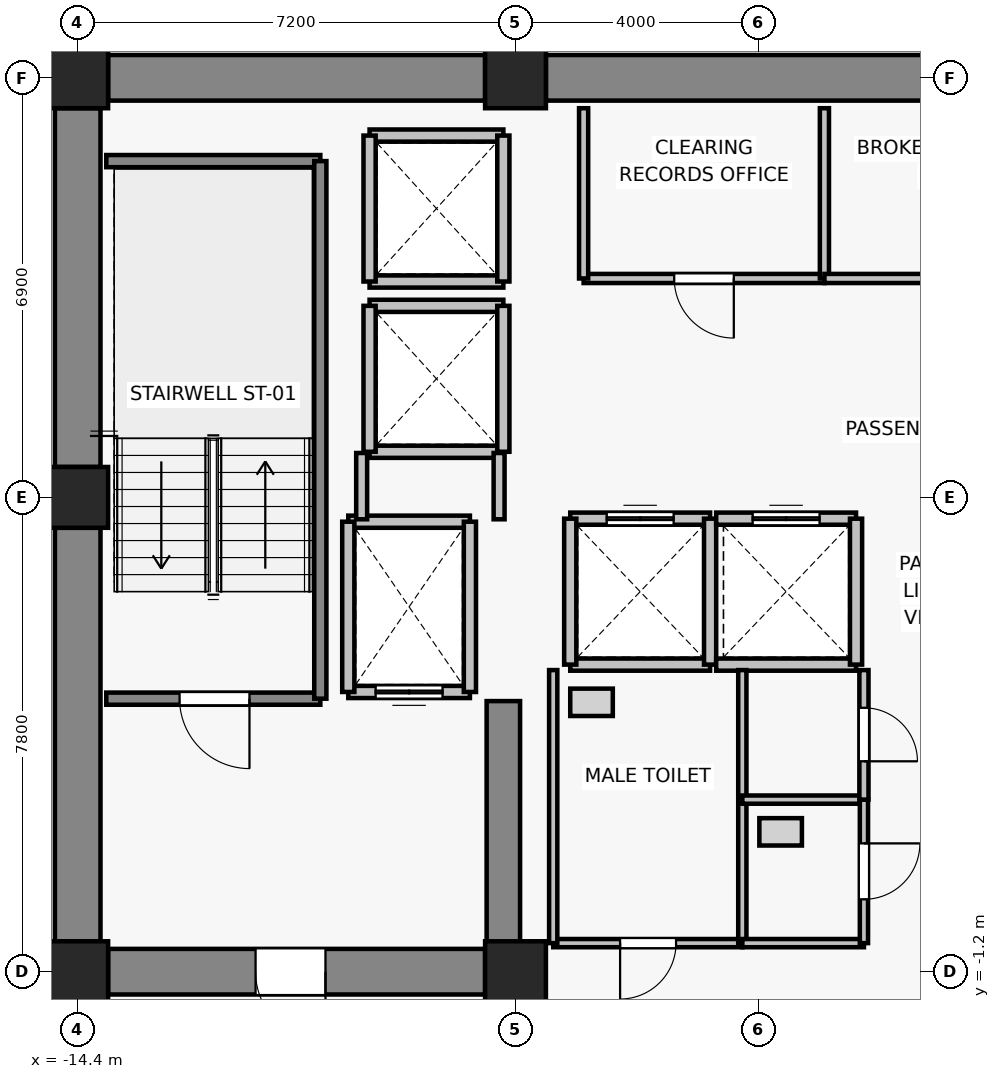
"""IFC4 building model, lengths in metres.
Left out: names, types, materials, properties, quantities, classifications, styles, units other than length and angle.
Written with IfcOpenShell. Run it as: python <this file> out.ifc"""

import sys

from ifc_helpers import new_model, si_unit, direction, frame, frame_2d, origin, origin_2d, place, context, subcontext, project, spatial, rectangle, extrude, source, transform, mapped, element, fill, save


model = new_model("IFC4")
c1 = context("Model", 3, precision=1e-05, world=origin(), true_north=direction((0.0, 1.0)))
c2 = subcontext(c1, "Body", "Model", "MODEL_VIEW")
j1 = project(units=[si_unit("LENGTHUNIT", "METRE"), si_unit("PLANEANGLEUNIT", "RADIAN")], contexts=[c1])
p1 = place(None, origin())
s1 = spatial("IfcSite", under=j1, at=p1, CompositionType="ELEMENT")
p2 = place(p1, origin())
s2 = spatial("IfcBuilding", under=s1, at=p2, CompositionType="ELEMENT")
p3 = place(p2, frame((0.0, 0.0, 175.9)))
s3 = spatial("IfcBuildingStorey", under=s2, at=p3, CompositionType="ELEMENT", Elevation=175.9)
for number, where, z_axis, x_axis in (
    (1, (-14.4, -1.2, 0.0), (0.0, 0.0, 1.0), (1.0, 0.0, 0.0)),
    (2, (-7.2, -1.2, 0.0), (0.0, 0.0, 1.0), (1.0, 0.0, 0.0)),
    (3, (-14.4, 6.6, 0.0), (0.0, 0.0, 1.0), (1.0, 0.0, 0.0)),
    (4, (-14.4, 13.5, 0.0), (0.0, 0.0, 1.0), (1.0, 0.0, 0.0)),
    (5, (-7.2, 13.5, 0.0), (0.0, 0.0, 1.0), (1.0, 0.0, 0.0)),
):
    element("IfcColumn", number, at=place(p3, frame(where, z_axis=z_axis, x_axis=x_axis)), inside=s3, PredefinedType="COLUMN", context=c2, shape_type="SweptSolid", body=[
        extrude(rectangle(XDim=1.0, YDim=1.0, at=origin_2d()), origin(), (0.0, 0.0, 1.0), 3.3),
    ])
p4 = place(p3, frame((-13.9, 13.5, 0.0), z_axis=(0.0, 0.0, 1.0), x_axis=(1.0, 0.0, 0.0)))
e6 = element("IfcWall", 6, at=p4, inside=s3, PredefinedType="SHEAR", context=c2, shape_type="SweptSolid", body=[
    extrude(rectangle(XDim=6.2, YDim=0.75, at=frame_2d((3.1, 0.0))), origin(), (0.0, 0.0, 1.0), 3.075),
])
p5 = place(p3, frame((-6.7, 13.5, 0.0), z_axis=(0.0, 0.0, 1.0), x_axis=(1.0, 0.0, 0.0)))
e7 = element("IfcWall", 7, at=p5, inside=s3, PredefinedType="SHEAR", context=c2, shape_type="SweptSolid", body=[
    extrude(rectangle(XDim=13.4, YDim=0.75, at=frame_2d((6.7, 0.0))), origin(), (0.0, 0.0, 1.0), 3.075),
])
p6 = place(p3, frame((-14.4, -0.7, 0.0), z_axis=(0.0, 0.0, 1.0), x_axis=(0.0, 1.0, 0.0)))
e8 = element("IfcWall", 8, at=p6, inside=s3, PredefinedType="SHEAR", context=c2, shape_type="SweptSolid", body=[
    extrude(rectangle(XDim=6.8, YDim=0.75, at=frame_2d((3.4, 0.0))), origin(), (0.0, 0.0, 1.0), 3.075),
])
p7 = place(p3, frame((-14.4, 7.1, 0.0), z_axis=(0.0, 0.0, 1.0), x_axis=(0.0, 1.0, 0.0)))
e9 = element("IfcWall", 9, at=p7, inside=s3, PredefinedType="SHEAR", context=c2, shape_type="SweptSolid", body=[
    extrude(rectangle(XDim=5.9, YDim=0.75, at=frame_2d((2.95, 0.0))), origin(), (0.0, 0.0, 1.0), 3.075),
])
p8 = place(p3, frame((-7.7, -1.2, 0.0), z_axis=(0.0, 0.0, 1.0), x_axis=(-1.0, 0.0, 0.0)))
e10 = element("IfcWall", 10, at=p8, inside=s3, PredefinedType="SHEAR", context=c2, shape_type="SweptSolid", body=[
    extrude(rectangle(XDim=6.2, YDim=0.75, at=frame_2d((3.1, 0.0))), origin(), (0.0, 0.0, 1.0), 3.075),
])
p9 = place(p8, frame((2.625, 0.0, 0.0)))
e11 = element("IfcOpeningElement", 11, at=p9, cuts=e10, PredefinedType="OPENING", context=c2, shape_type="SweptSolid", body=[
    extrude(rectangle(XDim=1.15, YDim=2.15, at=frame_2d((0.575, 1.075))), frame((0.0, 0.385, 0.0), z_axis=(0.0, -1.0, 0.0), x_axis=(1.0, 0.0, 0.0)), (0.0, 0.0, 1.0), 0.77),
])
p10 = place(p3, frame((-7.4, -0.825, 0.0), z_axis=(0.0, 0.0, 1.0), x_axis=(0.0, 1.0, 0.0)))
e12 = element("IfcWall", 12, at=p10, inside=s3, PredefinedType="SHEAR", context=c2, shape_type="SweptSolid", body=[
    extrude(rectangle(XDim=4.075, YDim=0.55, at=frame_2d((2.038, 0.0))), origin(), (0.0, 0.0, 1.0), 3.075),
])
p11 = place(p3, frame((-7.95, 3.4, 0.0), z_axis=(0.0, 0.0, 1.0), x_axis=(-1.0, 0.0, 0.0)))
e13 = element("IfcWall", 13, at=p11, inside=s3, PredefinedType="SOLIDWALL", context=c2, shape_type="SweptSolid", body=[
    extrude(rectangle(XDim=2.0, YDim=0.2, at=frame_2d((1.0, 0.0))), origin(), (0.0, 0.0, 1.0), 3.075),
])
p12 = place(p11, frame((0.45, 0.0, 0.0)))
e14 = element("IfcOpeningElement", 14, at=p12, cuts=e13, PredefinedType="OPENING", context=c2, shape_type="SweptSolid", body=[
    extrude(rectangle(XDim=1.1, YDim=2.2, at=frame_2d((0.55, 1.1))), frame((0.0, 0.11, 0.0), z_axis=(0.0, -1.0, 0.0), x_axis=(1.0, 0.0, 0.0)), (0.0, 0.0, 1.0), 0.22),
])
p13 = place(p3, frame((-9.95, 6.2, 0.0), z_axis=(0.0, 0.0, 1.0), x_axis=(1.0, 0.0, 0.0)))
e15 = element("IfcWall", 15, at=p13, inside=s3, PredefinedType="SOLIDWALL", context=c2, shape_type="SweptSolid", body=[
    extrude(rectangle(XDim=2.0, YDim=0.2, at=frame_2d((1.0, 0.0))), origin(), (0.0, 0.0, 1.0), 3.075),
])
for number, where, z_axis, x_axis in (
    (16, (-9.95, 3.4, 0.0), (0.0, 0.0, 1.0), (0.0, 1.0, 0.0)),
    (17, (-7.95, 6.2, 0.0), (0.0, 0.0, 1.0), (0.0, -1.0, 0.0)),
):
    element("IfcWall", number, at=place(p3, frame(where, z_axis=z_axis, x_axis=x_axis)), inside=s3, PredefinedType="SOLIDWALL", context=c2, shape_type="SweptSolid", body=[
        extrude(rectangle(XDim=2.8, YDim=0.2, at=frame_2d((1.4, 0.0))), origin(), (0.0, 0.0, 1.0), 3.075),
    ])
p14 = place(p3, frame((-4.0, 3.85, 0.0), z_axis=(0.0, 0.0, 1.0), x_axis=(-1.0, 0.0, 0.0)))
e18 = element("IfcWall", 18, at=p14, inside=s3, PredefinedType="SOLIDWALL", context=c2, shape_type="SweptSolid", body=[
    extrude(rectangle(XDim=2.3, YDim=0.2, at=frame_2d((1.15, 0.0))), origin(), (0.0, 0.0, 1.0), 3.075),
])
p15 = place(p3, frame((-6.3, 6.25, 0.0), z_axis=(0.0, 0.0, 1.0), x_axis=(1.0, 0.0, 0.0)))
e19 = element("IfcWall", 19, at=p15, inside=s3, PredefinedType="SOLIDWALL", context=c2, shape_type="SweptSolid", body=[
    extrude(rectangle(XDim=2.3, YDim=0.2, at=frame_2d((1.15, 0.0))), origin(), (0.0, 0.0, 1.0), 3.075),
])
p16 = place(p15, frame((0.6, 0.0, 0.0)))
e20 = element("IfcOpeningElement", 20, at=p16, cuts=e19, PredefinedType="OPENING", context=c2, shape_type="SweptSolid", body=[
    extrude(rectangle(XDim=1.1, YDim=2.2, at=frame_2d((0.55, 1.1))), frame((0.0, 0.11, 0.0), z_axis=(0.0, -1.0, 0.0), x_axis=(1.0, 0.0, 0.0)), (0.0, 0.0, 1.0), 0.22),
])
for number, where, z_axis, x_axis in (
    (21, (-6.3, 3.85, 0.0), (0.0, 0.0, 1.0), (0.0, 1.0, 0.0)),
    (22, (-4.0, 6.25, 0.0), (0.0, 0.0, 1.0), (0.0, -1.0, 0.0)),
):
    element("IfcWall", number, at=place(p3, frame(where, z_axis=z_axis, x_axis=x_axis)), inside=s3, PredefinedType="SOLIDWALL", context=c2, shape_type="SweptSolid", body=[
        extrude(rectangle(XDim=2.4, YDim=0.2, at=frame_2d((1.2, 0.0))), origin(), (0.0, 0.0, 1.0), 3.075),
    ])
p17 = place(p3, frame((-1.6, 3.85, 0.0), z_axis=(0.0, 0.0, 1.0), x_axis=(-1.0, 0.0, 0.0)))
e23 = element("IfcWall", 23, at=p17, inside=s3, PredefinedType="SOLIDWALL", context=c2, shape_type="SweptSolid", body=[
    extrude(rectangle(XDim=2.3, YDim=0.2, at=frame_2d((1.15, 0.0))), origin(), (0.0, 0.0, 1.0), 3.075),
])
p18 = place(p3, frame((-3.9, 6.25, 0.0), z_axis=(0.0, 0.0, 1.0), x_axis=(1.0, 0.0, 0.0)))
e24 = element("IfcWall", 24, at=p18, inside=s3, PredefinedType="SOLIDWALL", context=c2, shape_type="SweptSolid", body=[
    extrude(rectangle(XDim=2.3, YDim=0.2, at=frame_2d((1.15, 0.0))), origin(), (0.0, 0.0, 1.0), 3.075),
])
p19 = place(p18, frame((0.6, 0.0, 0.0)))
e25 = element("IfcOpeningElement", 25, at=p19, cuts=e24, PredefinedType="OPENING", context=c2, shape_type="SweptSolid", body=[
    extrude(rectangle(XDim=1.1, YDim=2.2, at=frame_2d((0.55, 1.1))), frame((0.0, 0.11, 0.0), z_axis=(0.0, -1.0, 0.0), x_axis=(1.0, 0.0, 0.0)), (0.0, 0.0, 1.0), 0.22),
])
p20 = place(p3, frame((-1.6, 6.25, 0.0), z_axis=(0.0, 0.0, 1.0), x_axis=(0.0, -1.0, 0.0)))
e26 = element("IfcWall", 26, at=p20, inside=s3, PredefinedType="SOLIDWALL", context=c2, shape_type="SweptSolid", body=[
    extrude(rectangle(XDim=2.4, YDim=0.2, at=frame_2d((1.2, 0.0))), origin(), (0.0, 0.0, 1.0), 3.075),
])
for number, where, z_axis, x_axis in (
    (27, (-7.4, 7.35, 0.0), (0.0, 0.0, 1.0), (-1.0, 0.0, 0.0)),
    (28, (-9.6, 9.75, 0.0), (0.0, 0.0, 1.0), (1.0, 0.0, 0.0)),
):
    element("IfcWall", number, at=place(p3, frame(where, z_axis=z_axis, x_axis=x_axis)), inside=s3, PredefinedType="SOLIDWALL", context=c2, shape_type="SweptSolid", body=[
        extrude(rectangle(XDim=2.2, YDim=0.2, at=frame_2d((1.1, 0.0))), origin(), (0.0, 0.0, 1.0), 2.565),
    ])
p21 = place(p3, frame((-9.6, 7.35, 0.0), z_axis=(0.0, 0.0, 1.0), x_axis=(0.0, 1.0, 0.0)))
e29 = element("IfcWall", 29, at=p21, inside=s3, PredefinedType="SOLIDWALL", context=c2, shape_type="SweptSolid", body=[
    extrude(rectangle(XDim=2.4, YDim=0.2, at=frame_2d((1.2, 0.0))), origin(), (0.0, 0.0, 1.0), 3.075),
])
p22 = place(p3, frame((-7.4, 9.75, 0.0), z_axis=(0.0, 0.0, 1.0), x_axis=(0.0, -1.0, 0.0)))
e30 = element("IfcWall", 30, at=p22, inside=s3, PredefinedType="SOLIDWALL", context=c2, shape_type="SweptSolid", body=[
    extrude(rectangle(XDim=2.4, YDim=0.2, at=frame_2d((1.2, 0.0))), origin(), (0.0, 0.0, 1.0), 2.565),
])
for number, where, z_axis, x_axis in (
    (31, (-7.4, 10.15, 0.0), (0.0, 0.0, 1.0), (-1.0, 0.0, 0.0)),
    (32, (-9.6, 12.55, 0.0), (0.0, 0.0, 1.0), (1.0, 0.0, 0.0)),
):
    element("IfcWall", number, at=place(p3, frame(where, z_axis=z_axis, x_axis=x_axis)), inside=s3, PredefinedType="SOLIDWALL", context=c2, shape_type="SweptSolid", body=[
        extrude(rectangle(XDim=2.2, YDim=0.2, at=frame_2d((1.1, 0.0))), origin(), (0.0, 0.0, 1.0), 2.565),
    ])
p23 = place(p3, frame((-9.6, 10.15, 0.0), z_axis=(0.0, 0.0, 1.0), x_axis=(0.0, 1.0, 0.0)))
e33 = element("IfcWall", 33, at=p23, inside=s3, PredefinedType="SOLIDWALL", context=c2, shape_type="SweptSolid", body=[
    extrude(rectangle(XDim=2.4, YDim=0.2, at=frame_2d((1.2, 0.0))), origin(), (0.0, 0.0, 1.0), 3.075),
])
p24 = place(p3, frame((-7.4, 12.55, 0.0), z_axis=(0.0, 0.0, 1.0), x_axis=(0.0, -1.0, 0.0)))
e34 = element("IfcWall", 34, at=p24, inside=s3, PredefinedType="SOLIDWALL", context=c2, shape_type="SweptSolid", body=[
    extrude(rectangle(XDim=2.4, YDim=0.2, at=frame_2d((1.2, 0.0))), origin(), (0.0, 0.0, 1.0), 2.565),
])
p25 = place(p3, frame((-10.41, 3.29, 0.0), z_axis=(0.0, 0.0, 1.0), x_axis=(-1.0, 0.0, 0.0)))
e35 = element("IfcWall", 35, at=p25, inside=s3, PredefinedType="SOLIDWALL", context=c2, shape_type="SweptSolid", body=[
    extrude(rectangle(XDim=3.52, YDim=0.2, at=frame_2d((1.76, 0.0))), origin(), (0.0, 0.0, 1.0), 3.075),
])
p26 = place(p25, frame((1.165, 0.0, 0.0)))
e36 = element("IfcOpeningElement", 36, at=p26, cuts=e35, PredefinedType="OPENING", context=c2, shape_type="SweptSolid", body=[
    extrude(rectangle(XDim=1.15, YDim=2.15, at=frame_2d((0.575, 1.075))), frame((0.0, 0.11, 0.0), z_axis=(0.0, -1.0, 0.0), x_axis=(1.0, 0.0, 0.0)), (0.0, 0.0, 1.0), 0.22),
])
p27 = place(p3, frame((-13.93, 12.13, 0.0), z_axis=(0.0, 0.0, 1.0), x_axis=(1.0, 0.0, 0.0)))
e37 = element("IfcWall", 37, at=p27, inside=s3, PredefinedType="SOLIDWALL", context=c2, shape_type="SweptSolid", body=[
    extrude(rectangle(XDim=3.52, YDim=0.2, at=frame_2d((1.76, 0.0))), origin(), (0.0, 0.0, 1.0), 3.075),
])
p28 = place(p3, frame((-10.41, 12.13, 0.0), z_axis=(0.0, 0.0, 1.0), x_axis=(0.0, -1.0, 0.0)))
e38 = element("IfcWall", 38, at=p28, inside=s3, PredefinedType="SOLIDWALL", context=c2, shape_type="SweptSolid", body=[
    extrude(rectangle(XDim=8.84, YDim=0.2, at=frame_2d((4.42, 0.0))), origin(), (0.0, 0.0, 1.0), 3.075),
])
p29 = place(p3, frame((-9.73, 6.24, 0.0), z_axis=(0.0, 0.0, 1.0), x_axis=(0.0, 1.0, 0.0)))
e39 = element("IfcWall", 39, at=p29, inside=s3, PredefinedType="PARTITIONING", context=c2, shape_type="SweptSolid", body=[
    extrude(rectangle(XDim=1.09, YDim=0.18, at=frame_2d((0.545, 0.0))), origin(), (0.0, 0.0, 1.0), 3.075),
])
p30 = place(p3, frame((-7.47, 7.33, 0.0), z_axis=(0.0, 0.0, 1.0), x_axis=(0.0, -1.0, 0.0)))
e40 = element("IfcWall", 40, at=p30, inside=s3, PredefinedType="PARTITIONING", context=c2, shape_type="SweptSolid", body=[
    extrude(rectangle(XDim=1.09, YDim=0.18, at=frame_2d((0.545, 0.0))), origin(), (0.0, 0.0, 1.0), 2.565),
])
p31 = place(p3, frame((-2.12, 10.2, 0.0), z_axis=(0.0, 0.0, 1.0), x_axis=(-1.0, 0.0, 0.0)))
e41 = element("IfcWall", 41, at=p31, inside=s3, PredefinedType="PARTITIONING", context=c2, shape_type="SweptSolid", body=[
    extrude(rectangle(XDim=3.96, YDim=0.15, at=frame_2d((1.98, 0.0))), origin(), (0.0, 0.0, 1.0), 3.075),
])
p32 = place(p31, frame((1.49, 0.0, 0.0)))
e42 = element("IfcOpeningElement", 42, at=p32, cuts=e41, PredefinedType="OPENING", context=c2, shape_type="SweptSolid", body=[
    extrude(rectangle(XDim=0.98, YDim=2.15, at=frame_2d((0.49, 1.075))), frame((0.0, 0.085, 0.0), z_axis=(0.0, -1.0, 0.0), x_axis=(1.0, 0.0, 0.0)), (0.0, 0.0, 1.0), 0.17),
])
for number, where, z_axis, x_axis in (
    (43, (-6.08, 10.2, 0.0), (0.0, 0.0, 1.0), (0.0, 1.0, 0.0)),
    (44, (-2.12, 13.0, 0.0), (0.0, 0.0, 1.0), (0.0, -1.0, 0.0)),
):
    element("IfcWall", number, at=place(p3, frame(where, z_axis=z_axis, x_axis=x_axis)), inside=s3, PredefinedType="PARTITIONING", context=c2, shape_type="SweptSolid", body=[
        extrude(rectangle(XDim=2.8, YDim=0.15, at=frame_2d((1.4, 0.0))), origin(), (0.0, 0.0, 1.0), 3.075),
    ])
p33 = place(p3, frame((2.04, 10.2, 0.0), z_axis=(0.0, 0.0, 1.0), x_axis=(-1.0, 0.0, 0.0)))
e45 = element("IfcWall", 45, at=p33, inside=s3, PredefinedType="PARTITIONING", context=c2, shape_type="SweptSolid", body=[
    extrude(rectangle(XDim=4.16, YDim=0.15, at=frame_2d((2.08, 0.0))), origin(), (0.0, 0.0, 1.0), 3.075),
])
p34 = place(p33, frame((1.55, 0.0, 0.0)))
e46 = element("IfcOpeningElement", 46, at=p34, cuts=e45, PredefinedType="OPENING", context=c2, shape_type="SweptSolid", body=[
    extrude(rectangle(XDim=0.98, YDim=2.15, at=frame_2d((0.49, 1.075))), frame((0.0, 0.085, 0.0), z_axis=(0.0, -1.0, 0.0), x_axis=(1.0, 0.0, 0.0)), (0.0, 0.0, 1.0), 0.17),
])
p35 = place(p3, frame((-3.47, -0.73, 0.0), z_axis=(0.0, 0.0, 1.0), x_axis=(-1.0, 0.0, 0.0)))
e47 = element("IfcWall", 47, at=p35, inside=s3, PredefinedType="PARTITIONING", context=c2, shape_type="SweptSolid", body=[
    extrude(rectangle(XDim=3.11, YDim=0.135, at=frame_2d((1.555, 0.0))), origin(), (0.0, 0.0, 1.0), 3.075),
])
p36 = place(p35, frame((1.09, 0.0, 0.0)))
e48 = element("IfcOpeningElement", 48, at=p36, cuts=e47, PredefinedType="OPENING", context=c2, shape_type="SweptSolid", body=[
    extrude(rectangle(XDim=0.92, YDim=2.1, at=frame_2d((0.46, 1.05))), frame((0.0, 0.077, 0.0), z_axis=(0.0, -1.0, 0.0), x_axis=(1.0, 0.0, 0.0)), (0.0, 0.0, 1.0), 0.155),
])
for number, where, z_axis, x_axis in (
    (49, (-6.58, -0.73, 0.0), (0.0, 0.0, 1.0), (0.0, 1.0, 0.0)),
    (50, (-3.47, 3.76, 0.0), (0.0, 0.0, 1.0), (0.0, -1.0, 0.0)),
):
    element("IfcWall", number, at=place(p3, frame(where, z_axis=z_axis, x_axis=x_axis)), inside=s3, PredefinedType="PARTITIONING", context=c2, shape_type="SweptSolid", body=[
        extrude(rectangle(XDim=4.49, YDim=0.135, at=frame_2d((2.245, 0.0))), origin(), (0.0, 0.0, 1.0), 3.075),
    ])
for number, where, z_axis, x_axis in (
    (51, (-1.47, -0.73, 0.0), (0.0, 0.0, 1.0), (-1.0, 0.0, 0.0)),
    (52, (-3.47, 1.63, 0.0), (0.0, 0.0, 1.0), (1.0, 0.0, 0.0)),
):
    element("IfcWall", number, at=place(p3, frame(where, z_axis=z_axis, x_axis=x_axis)), inside=s3, PredefinedType="PARTITIONING", context=c2, shape_type="SweptSolid", body=[
        extrude(rectangle(XDim=2.0, YDim=0.135, at=frame_2d((1.0, 0.0))), origin(), (0.0, 0.0, 1.0), 3.075),
    ])
p37 = place(p3, frame((-1.47, 1.63, 0.0), z_axis=(0.0, 0.0, 1.0), x_axis=(0.0, -1.0, 0.0)))
e53 = element("IfcWall", 53, at=p37, inside=s3, PredefinedType="PARTITIONING", context=c2, shape_type="SweptSolid", body=[
    extrude(rectangle(XDim=2.36, YDim=0.135, at=frame_2d((1.18, 0.0))), origin(), (0.0, 0.0, 1.0), 3.075),
])
p38 = place(p37, frame((0.72, 0.0, 0.0)))
e54 = element("IfcOpeningElement", 54, at=p38, cuts=e53, PredefinedType="OPENING", context=c2, shape_type="SweptSolid", body=[
    extrude(rectangle(XDim=0.92, YDim=2.1, at=frame_2d((0.46, 1.05))), frame((0.0, 0.077, 0.0), z_axis=(0.0, -1.0, 0.0), x_axis=(1.0, 0.0, 0.0)), (0.0, 0.0, 1.0), 0.155),
])
p39 = place(p3, frame((-1.47, 3.76, 0.0), z_axis=(0.0, 0.0, 1.0), x_axis=(0.0, -1.0, 0.0)))
e55 = element("IfcWall", 55, at=p39, inside=s3, PredefinedType="PARTITIONING", context=c2, shape_type="SweptSolid", body=[
    extrude(rectangle(XDim=2.13, YDim=0.15, at=frame_2d((1.065, 0.0))), origin(), (0.0, 0.0, 1.0), 3.075),
])
p40 = place(p39, frame((0.62, 0.0, 0.0)))
e56 = element("IfcOpeningElement", 56, at=p40, cuts=e55, PredefinedType="OPENING", context=c2, shape_type="SweptSolid", body=[
    extrude(rectangle(XDim=0.88, YDim=2.1, at=frame_2d((0.44, 1.05))), frame((0.0, 0.085, 0.0), z_axis=(0.0, -1.0, 0.0), x_axis=(1.0, 0.0, 0.0)), (0.0, 0.0, 1.0), 0.17),
])
m1 = source(origin(), c2, "Body", "SweptSolid", [
    extrude(rectangle(XDim=1.1, YDim=2.2, at=frame_2d((0.55, 1.1))), frame((0.0, 0.025, 0.0), z_axis=(0.0, -1.0, 0.0), x_axis=(1.0, 0.0, 0.0)), (0.0, 0.0, 1.0), 0.05),
])
p41 = place(p12, origin())
e57 = element("IfcDoor", 57, at=p41, inside=s3, OperationType="DOUBLE_DOOR_SLIDING", PredefinedType="DOOR", context=c2, shape_type="MappedRepresentation", body=[
    mapped(m1, transform((0.0, 0.0, 0.0), x_axis=(1.0, 0.0, 0.0), y_axis=(0.0, 1.0, 0.0), z_axis=(0.0, 0.0, 1.0), scale=1.0)),
])
fill(e14, e57)
p42 = place(p16, origin())
e58 = element("IfcDoor", 58, at=p42, inside=s3, OperationType="DOUBLE_DOOR_SLIDING", PredefinedType="DOOR", context=c2, shape_type="MappedRepresentation", body=[
    mapped(m1, transform((0.0, 0.0, 0.0), x_axis=(1.0, 0.0, 0.0), y_axis=(0.0, 1.0, 0.0), z_axis=(0.0, 0.0, 1.0), scale=1.0)),
])
fill(e20, e58)
p43 = place(p19, origin())
e59 = element("IfcDoor", 59, at=p43, inside=s3, OperationType="DOUBLE_DOOR_SLIDING", PredefinedType="DOOR", context=c2, shape_type="MappedRepresentation", body=[
    mapped(m1, transform((0.0, 0.0, 0.0), x_axis=(1.0, 0.0, 0.0), y_axis=(0.0, 1.0, 0.0), z_axis=(0.0, 0.0, 1.0), scale=1.0)),
])
fill(e25, e59)
m2 = source(origin(), c2, "Body", "SweptSolid", [
    extrude(rectangle(XDim=1.15, YDim=2.15, at=frame_2d((0.575, 1.075))), frame((0.0, 0.025, 0.0), z_axis=(0.0, -1.0, 0.0), x_axis=(1.0, 0.0, 0.0)), (0.0, 0.0, 1.0), 0.05),
])
p44 = place(p26, origin())
e60 = element("IfcDoor", 60, at=p44, inside=s3, OperationType="SINGLE_SWING_LEFT", PredefinedType="DOOR", context=c2, shape_type="MappedRepresentation", body=[
    mapped(m2, transform((0.0, 0.0, 0.0), x_axis=(1.0, 0.0, 0.0), y_axis=(0.0, 1.0, 0.0), z_axis=(0.0, 0.0, 1.0), scale=1.0)),
])
fill(e36, e60)
p45 = place(p9, origin())
e61 = element("IfcDoor", 61, at=p45, inside=s3, OperationType="SINGLE_SWING_LEFT", PredefinedType="DOOR", context=c2, shape_type="MappedRepresentation", body=[
    mapped(m2, transform((0.0, 0.0, 0.0), x_axis=(1.0, 0.0, 0.0), y_axis=(0.0, 1.0, 0.0), z_axis=(0.0, 0.0, 1.0), scale=1.0)),
])
fill(e11, e61)
m3 = source(origin(), c2, "Body", "SweptSolid", [
    extrude(rectangle(XDim=0.98, YDim=2.15, at=frame_2d((0.49, 1.075))), frame((0.0, 0.025, 0.0), z_axis=(0.0, -1.0, 0.0), x_axis=(1.0, 0.0, 0.0)), (0.0, 0.0, 1.0), 0.05),
])
p46 = place(p32, origin())
e62 = element("IfcDoor", 62, at=p46, inside=s3, OperationType="SINGLE_SWING_LEFT", PredefinedType="DOOR", context=c2, shape_type="MappedRepresentation", body=[
    mapped(m3, transform((0.0, 0.0, 0.0), x_axis=(1.0, 0.0, 0.0), y_axis=(0.0, 1.0, 0.0), z_axis=(0.0, 0.0, 1.0), scale=1.0)),
])
fill(e42, e62)
m4 = source(origin(), c2, "Body", "SweptSolid", [
    extrude(rectangle(XDim=0.92, YDim=2.1, at=frame_2d((0.46, 1.05))), frame((0.0, 0.025, 0.0), z_axis=(0.0, -1.0, 0.0), x_axis=(1.0, 0.0, 0.0)), (0.0, 0.0, 1.0), 0.05),
])
p47 = place(p36, origin())
e63 = element("IfcDoor", 63, at=p47, inside=s3, OperationType="SINGLE_SWING_RIGHT", PredefinedType="DOOR", context=c2, shape_type="MappedRepresentation", body=[
    mapped(m4, transform((0.0, 0.0, 0.0), x_axis=(1.0, 0.0, 0.0), y_axis=(0.0, 1.0, 0.0), z_axis=(0.0, 0.0, 1.0), scale=1.0)),
])
fill(e48, e63)
p48 = place(p38, origin())
e64 = element("IfcDoor", 64, at=p48, inside=s3, OperationType="SINGLE_SWING_LEFT", PredefinedType="DOOR", context=c2, shape_type="MappedRepresentation", body=[
    mapped(m4, transform((0.0, 0.0, 0.0), x_axis=(1.0, 0.0, 0.0), y_axis=(0.0, 1.0, 0.0), z_axis=(0.0, 0.0, 1.0), scale=1.0)),
])
fill(e54, e64)
m5 = source(origin(), c2, "Body", "SweptSolid", [
    extrude(rectangle(XDim=0.88, YDim=2.1, at=frame_2d((0.44, 1.05))), frame((0.0, 0.025, 0.0), z_axis=(0.0, -1.0, 0.0), x_axis=(1.0, 0.0, 0.0)), (0.0, 0.0, 1.0), 0.05),
])
p49 = place(p40, origin())
e65 = element("IfcDoor", 65, at=p49, inside=s3, OperationType="SINGLE_SWING_RIGHT", PredefinedType="DOOR", context=c2, shape_type="MappedRepresentation", body=[
    mapped(m5, transform((0.0, 0.0, 0.0), x_axis=(1.0, 0.0, 0.0), y_axis=(0.0, 1.0, 0.0), z_axis=(0.0, 0.0, 1.0), scale=1.0)),
])
fill(e56, e65)
save(model, sys.argv[1])
